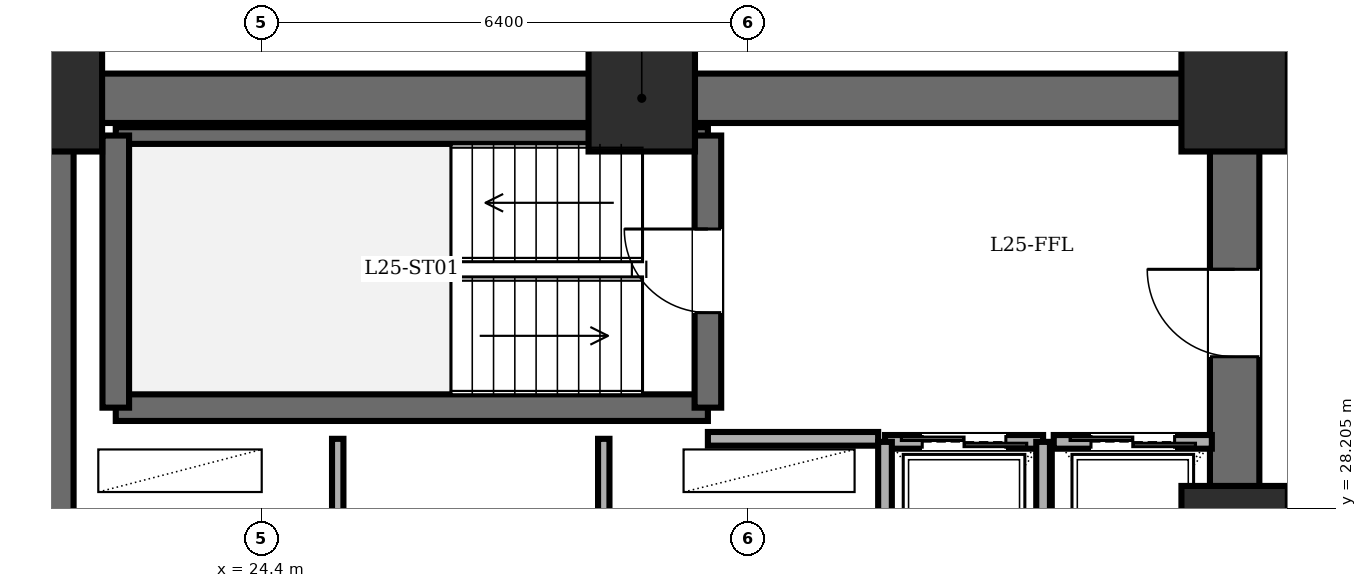
"""IFC4 building model, lengths in metres.
Left out: names, types, materials, properties, quantities, classifications, styles, units other than length and angle.
Written with IfcOpenShell. Run it as: python <this file> out.ifc"""

import sys

from ifc_helpers import new_model, si_unit, direction, frame, frame_2d, origin, origin_2d, place, context, subcontext, project, spatial, rectangle, extrude, element, fill, save


model = new_model("IFC4")
c1 = context("Model", 3, precision=1e-05, world=origin(), true_north=direction((0.0, 1.0)))
c2 = subcontext(c1, "Body", "Model", "MODEL_VIEW")
j1 = project(units=[si_unit("LENGTHUNIT", "METRE"), si_unit("PLANEANGLEUNIT", "RADIAN")], contexts=[c1])
p1 = place(None, origin())
s1 = spatial("IfcSite", under=j1, at=p1, CompositionType="ELEMENT")
p2 = place(p1, origin())
s2 = spatial("IfcBuilding", under=s1, at=p2, CompositionType="ELEMENT")
p3 = place(p2, frame((0.0, 0.0, 97.1)))
s3 = spatial("IfcBuildingStorey", under=s2, at=p3, CompositionType="ELEMENT", Elevation=97.1)
for number, where, z_axis, x_axis in (
    (1, (37.2, 27.8, 0.0), (0.0, 0.0, 1.0), (1.0, 0.0, 0.0)),
    (2, (37.2, 33.6, 0.0), (0.0, 0.0, 1.0), (1.0, 0.0, 0.0)),
    (3, (29.4, 33.6, 0.0), (0.0, 0.0, 1.0), (1.0, 0.0, 0.0)),
    (4, (21.6, 33.6, 0.0), (0.0, 0.0, 1.0), (1.0, 0.0, 0.0)),
):
    element("IfcColumn", number, at=place(p3, frame(where, z_axis=z_axis, x_axis=x_axis)), inside=s3, PredefinedType="COLUMN", context=c2, shape_type="SweptSolid", body=[
        extrude(rectangle(XDim=1.4, YDim=1.4, at=origin_2d()), origin(), (0.0, 0.0, 1.0), 3.6),
    ])
p4 = place(p3, frame((21.6, 14.4, 0.0), z_axis=(0.0, 0.0, 1.0), x_axis=(0.0, 1.0, 0.0)))
e5 = element("IfcWall", 5, at=p4, inside=s3, PredefinedType="SHEAR", context=c2, shape_type="SweptSolid", body=[
    extrude(rectangle(XDim=19.2, YDim=0.65, at=frame_2d((9.6, 0.0))), origin(), (0.0, 0.0, 1.0), 3.4),
])
p5 = place(p3, frame((21.6, 33.6, 0.0), z_axis=(0.0, 0.0, 1.0), x_axis=(1.0, 0.0, 0.0)))
e6 = element("IfcWall", 6, at=p5, inside=s3, PredefinedType="SHEAR", context=c2, shape_type="SweptSolid", body=[
    extrude(rectangle(XDim=15.6, YDim=0.65, at=frame_2d((7.8, 0.0))), origin(), (0.0, 0.0, 1.0), 3.4),
])
p6 = place(p3, frame((37.2, 14.4, 0.0), z_axis=(0.0, 0.0, 1.0), x_axis=(0.0, 1.0, 0.0)))
e7 = element("IfcWall", 7, at=p6, inside=s3, PredefinedType="SHEAR", context=c2, shape_type="SweptSolid", body=[
    extrude(rectangle(XDim=19.2, YDim=0.65, at=frame_2d((9.6, 0.0))), origin(), (0.0, 0.0, 1.0), 3.4),
])
p7 = place(p6, frame((15.8, 0.0, 0.0)))
e8 = element("IfcOpeningElement", 8, at=p7, cuts=e7, PredefinedType="OPENING", context=c2, shape_type="SweptSolid", body=[
    extrude(rectangle(XDim=1.15, YDim=2.15, at=frame_2d((0.575, 1.075))), frame((0.0, 0.335, 0.0), z_axis=(0.0, -1.0, 0.0), x_axis=(1.0, 0.0, 0.0)), (0.0, 0.0, 1.0), 0.67),
])
p8 = place(p6, frame((3.6, 0.0, 0.0)))
e9 = element("IfcOpeningElement", 9, at=p8, cuts=e7, PredefinedType="OPENING", context=c2, shape_type="SweptSolid", body=[
    extrude(rectangle(XDim=1.1, YDim=2.15, at=frame_2d((0.55, 1.075))), frame((0.0, 0.335, 0.0), z_axis=(0.0, -1.0, 0.0), x_axis=(1.0, 0.0, 0.0)), (0.0, 0.0, 1.0), 0.67),
])
p9 = place(p6, frame((8.6, 0.0, 0.0)))
e10 = element("IfcOpeningElement", 10, at=p9, cuts=e7, PredefinedType="OPENING", context=c2, shape_type="SweptSolid", body=[
    extrude(rectangle(XDim=1.3, YDim=2.2, at=frame_2d((0.65, 1.1))), frame((0.0, 0.335, 0.0), z_axis=(0.0, -1.0, 0.0), x_axis=(1.0, 0.0, 0.0)), (0.0, 0.0, 1.0), 0.67),
])
p10 = place(p3, frame((22.48, 29.53, 0.0), z_axis=(0.0, 0.0, 1.0), x_axis=(1.0, 0.0, 0.0)))
e11 = element("IfcWall", 11, at=p10, inside=s3, PredefinedType="SOLIDWALL", context=c2, shape_type="SweptSolid", body=[
    extrude(rectangle(XDim=7.79, YDim=0.35, at=frame_2d((3.895, 0.0))), origin(), (0.0, 0.0, 1.0), 3.4),
])
p11 = place(p3, frame((22.48, 33.11, 0.0), z_axis=(0.0, 0.0, 1.0), x_axis=(1.0, 0.0, 0.0)))
e12 = element("IfcWall", 12, at=p11, inside=s3, PredefinedType="PARTITIONING", context=c2, shape_type="SweptSolid", body=[
    extrude(rectangle(XDim=7.79, YDim=0.22, at=frame_2d((3.895, 0.0))), origin(), (0.0, 0.0, 1.0), 3.4),
])
p12 = place(p3, frame((22.48, 29.53, 0.0), z_axis=(0.0, 0.0, 1.0), x_axis=(0.0, 1.0, 0.0)))
e13 = element("IfcWall", 13, at=p12, inside=s3, PredefinedType="SOLIDWALL", context=c2, shape_type="SweptSolid", body=[
    extrude(rectangle(XDim=3.58, YDim=0.35, at=frame_2d((1.79, 0.0))), origin(), (0.0, 0.0, 1.0), 3.4),
])
p13 = place(p3, frame((30.27, 29.53, 0.0), z_axis=(0.0, 0.0, 1.0), x_axis=(0.0, 1.0, 0.0)))
e14 = element("IfcWall", 14, at=p13, inside=s3, PredefinedType="SOLIDWALL", context=c2, shape_type="SweptSolid", body=[
    extrude(rectangle(XDim=3.58, YDim=0.35, at=frame_2d((1.79, 0.0))), origin(), (0.0, 0.0, 1.0), 3.4),
])
p14 = place(p13, frame((1.25, 0.0, 0.0)))
e15 = element("IfcOpeningElement", 15, at=p14, cuts=e14, PredefinedType="OPENING", context=c2, shape_type="SweptSolid", body=[
    extrude(rectangle(XDim=1.1, YDim=2.15, at=frame_2d((0.55, 1.075))), frame((0.0, 0.185, 0.0), z_axis=(0.0, -1.0, 0.0), x_axis=(1.0, 0.0, 0.0)), (0.0, 0.0, 1.0), 0.37),
])
p15 = place(p3, frame((30.27, 29.12, 0.0), z_axis=(0.0, 0.0, 1.0), x_axis=(1.0, 0.0, 0.0)))
e16 = element("IfcWall", 16, at=p15, inside=s3, PredefinedType="PARTITIONING", context=c2, shape_type="SweptSolid", body=[
    extrude(rectangle(XDim=2.24, YDim=0.18, at=frame_2d((1.12, 0.0))), origin(), (0.0, 0.0, 1.0), 3.4),
])
for number, where, z_axis, x_axis in (
    (17, (25.4, 27.6, 0.0), (0.0, 0.0, 1.0), (0.0, 1.0, 0.0)),
    (18, (28.9, 27.6, 0.0), (0.0, 0.0, 1.0), (0.0, 1.0, 0.0)),
):
    element("IfcWall", number, at=place(p3, frame(where, z_axis=z_axis, x_axis=x_axis)), inside=s3, PredefinedType="PARTITIONING", context=c2, shape_type="SweptSolid", body=[
        extrude(rectangle(XDim=1.52, YDim=0.15, at=frame_2d((0.76, 0.0))), origin(), (0.0, 0.0, 1.0), 3.4),
    ])
p16 = place(p3, frame((32.6, 29.08, 0.0), z_axis=(0.0, 0.0, 1.0), x_axis=(1.0, 0.0, 0.0)))
e19 = element("IfcWall", 19, at=p16, inside=s3, PredefinedType="PARTITIONING", context=c2, shape_type="SweptSolid", body=[
    extrude(rectangle(XDim=2.08, YDim=0.18, at=frame_2d((1.04, 0.0))), origin(), (0.0, 0.0, 1.0), 3.4),
])
p17 = place(p16, frame((0.49, 0.0, 0.0)))
e20 = element("IfcOpeningElement", 20, at=p17, cuts=e19, PredefinedType="OPENING", context=c2, shape_type="SweptSolid", body=[
    extrude(rectangle(XDim=1.1, YDim=2.2, at=frame_2d((0.55, 1.1))), frame((0.0, 0.1, 0.0), z_axis=(0.0, -1.0, 0.0), x_axis=(1.0, 0.0, 0.0)), (0.0, 0.0, 1.0), 0.2),
])
for number, where, z_axis, x_axis in (
    (21, (34.68, 26.35, 0.0), (0.0, 0.0, 1.0), (0.0, 1.0, 0.0)),
    (22, (32.6, 29.08, 0.0), (0.0, 0.0, 1.0), (0.0, -1.0, 0.0)),
):
    element("IfcWall", number, at=place(p3, frame(where, z_axis=z_axis, x_axis=x_axis)), inside=s3, PredefinedType="PARTITIONING", context=c2, shape_type="SweptSolid", body=[
        extrude(rectangle(XDim=2.73, YDim=0.18, at=frame_2d((1.365, 0.0))), origin(), (0.0, 0.0, 1.0), 3.4),
    ])
p18 = place(p3, frame((34.82, 29.08, 0.0), z_axis=(0.0, 0.0, 1.0), x_axis=(1.0, 0.0, 0.0)))
e23 = element("IfcWall", 23, at=p18, inside=s3, PredefinedType="PARTITIONING", context=c2, shape_type="SweptSolid", body=[
    extrude(rectangle(XDim=2.08, YDim=0.18, at=frame_2d((1.04, 0.0))), origin(), (0.0, 0.0, 1.0), 3.4),
])
p19 = place(p18, frame((0.49, 0.0, 0.0)))
e24 = element("IfcOpeningElement", 24, at=p19, cuts=e23, PredefinedType="OPENING", context=c2, shape_type="SweptSolid", body=[
    extrude(rectangle(XDim=1.1, YDim=2.2, at=frame_2d((0.55, 1.1))), frame((0.0, 0.1, 0.0), z_axis=(0.0, -1.0, 0.0), x_axis=(1.0, 0.0, 0.0)), (0.0, 0.0, 1.0), 0.2),
])
p20 = place(p14, origin())
e25 = element("IfcDoor", 25, at=p20, inside=s3, OperationType="SINGLE_SWING_RIGHT", PredefinedType="DOOR", context=c2, shape_type="SweptSolid", body=[
    extrude(rectangle(XDim=1.1, YDim=2.15, at=frame_2d((0.55, 1.075))), frame((0.0, 0.025, 0.0), z_axis=(0.0, -1.0, 0.0), x_axis=(1.0, 0.0, 0.0)), (0.0, 0.0, 1.0), 0.05),
])
fill(e15, e25)
p21 = place(p7, origin())
e26 = element("IfcDoor", 26, at=p21, inside=s3, OperationType="SINGLE_SWING_RIGHT", PredefinedType="DOOR", context=c2, shape_type="SweptSolid", body=[
    extrude(rectangle(XDim=1.15, YDim=2.15, at=frame_2d((0.575, 1.075))), frame((0.0, 0.025, 0.0), z_axis=(0.0, -1.0, 0.0), x_axis=(1.0, 0.0, 0.0)), (0.0, 0.0, 1.0), 0.05),
])
fill(e8, e26)
p22 = place(p17, origin())
e27 = element("IfcDoor", 27, at=p22, inside=s3, OperationType="DOUBLE_DOOR_SLIDING", PredefinedType="DOOR", context=c2, shape_type="SweptSolid", body=[
    extrude(rectangle(XDim=1.1, YDim=2.2, at=frame_2d((0.55, 1.1))), frame((0.0, 0.025, 0.0), z_axis=(0.0, -1.0, 0.0), x_axis=(1.0, 0.0, 0.0)), (0.0, 0.0, 1.0), 0.05),
])
fill(e20, e27)
p23 = place(p19, origin())
e28 = element("IfcDoor", 28, at=p23, inside=s3, OperationType="DOUBLE_DOOR_SLIDING", PredefinedType="DOOR", context=c2, shape_type="SweptSolid", body=[
    extrude(rectangle(XDim=1.1, YDim=2.2, at=frame_2d((0.55, 1.1))), frame((0.0, 0.025, 0.0), z_axis=(0.0, -1.0, 0.0), x_axis=(1.0, 0.0, 0.0)), (0.0, 0.0, 1.0), 0.05),
])
fill(e24, e28)
save(model, sys.argv[1])
